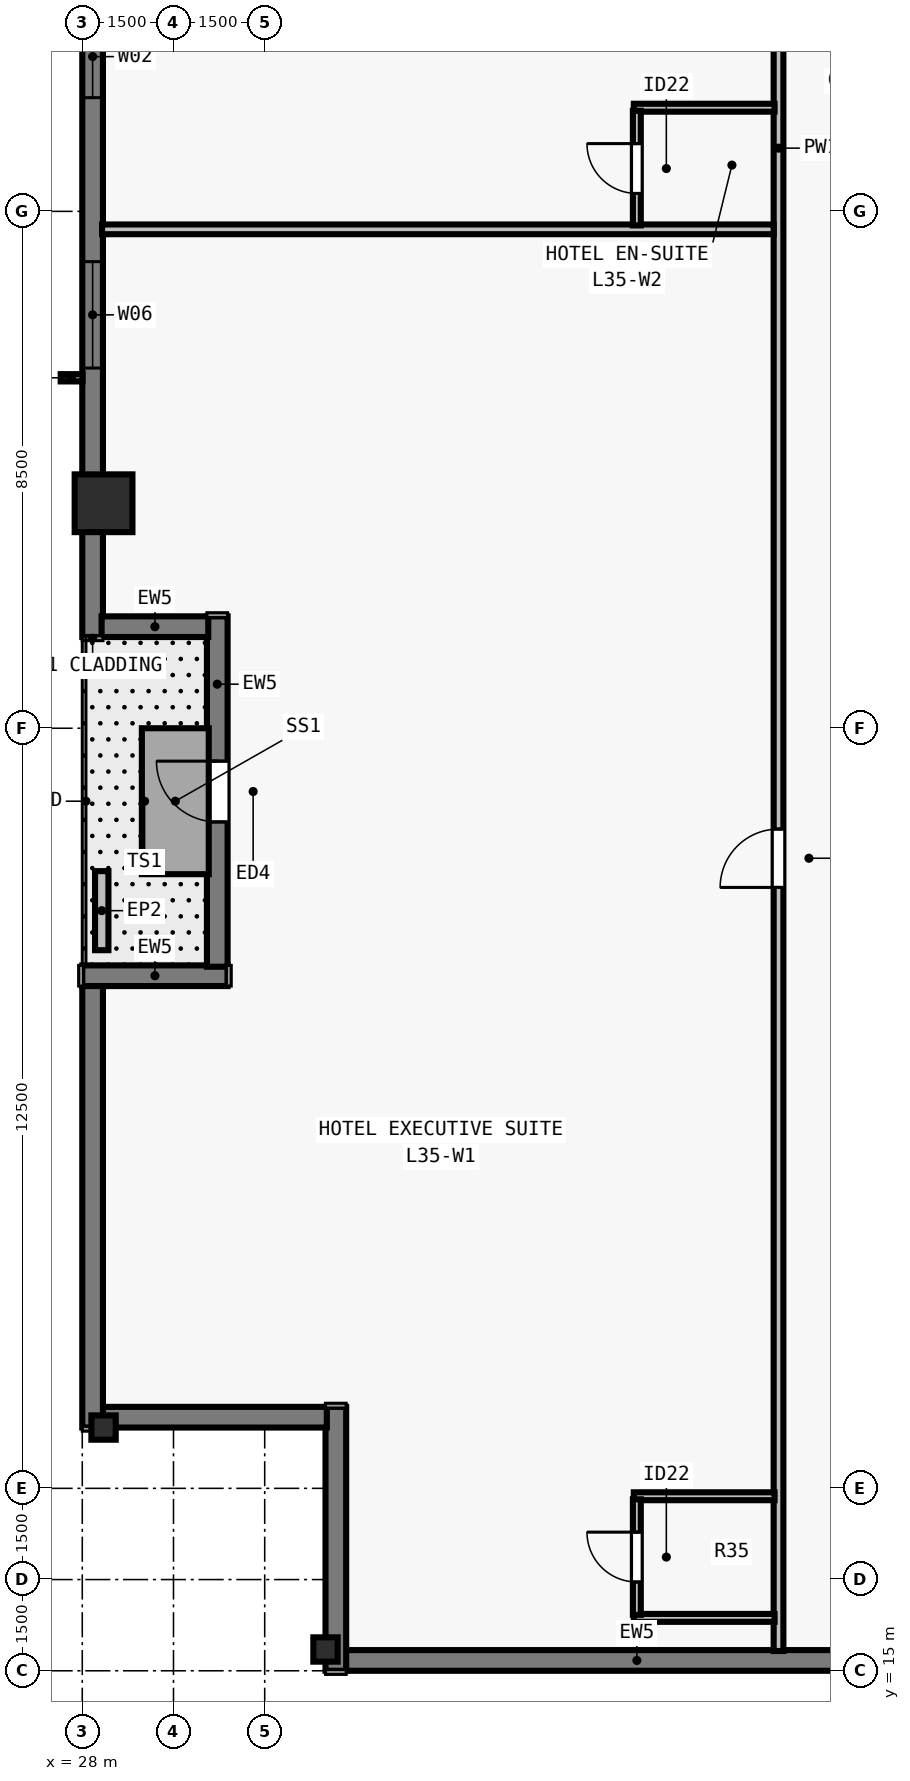
"""IFC4 building model, lengths in metres.
Left out: names, types, materials, properties, quantities, classifications, styles, units other than length and angle.
Written with IfcOpenShell. Run it as: python <this file> out.ifc"""

import sys

from ifc_helpers import new_model, si_unit, direction, frame, frame_2d, origin, origin_2d, place, context, subcontext, project, spatial, rectangle, i_section, extrude, element, fill, save


model = new_model("IFC4")
c1 = context("Model", 3, precision=1e-05, world=origin(), true_north=direction((0.0, 1.0)))
c2 = subcontext(c1, "Body", "Model", "MODEL_VIEW")
j1 = project(units=[si_unit("LENGTHUNIT", "METRE"), si_unit("PLANEANGLEUNIT", "RADIAN")], contexts=[c1])
p1 = place(None, origin())
s1 = spatial("IfcSite", under=j1, at=p1, CompositionType="ELEMENT")
p2 = place(p1, origin())
s2 = spatial("IfcBuilding", under=s1, at=p2, CompositionType="ELEMENT")
p3 = place(p2, frame((0.0, 0.0, 130.5)))
s3 = spatial("IfcBuildingStorey", under=s2, at=p3, CompositionType="ELEMENT", Elevation=130.5)
p4 = place(p3, frame((32.0, 15.35, 0.0), z_axis=(0.0, 0.0, 1.0), x_axis=(1.0, 0.0, 0.0)))
e1 = element("IfcColumn", 1, at=p4, inside=s3, PredefinedType="COLUMN", context=c2, shape_type="SweptSolid", body=[
    extrude(i_section(OverallWidth=0.4, OverallDepth=0.4, WebThickness=0.022, FlangeThickness=0.036, at=origin_2d()), origin(), (0.0, 0.0, 1.0), 3.5),
])
p5 = place(p3, frame((28.35, 34.2, 0.0), z_axis=(0.0, 0.0, 1.0), x_axis=(0.0, 1.0, 0.0)))
e2 = element("IfcColumn", 2, at=p5, inside=s3, PredefinedType="COLUMN", context=c2, shape_type="SweptSolid", body=[
    extrude(rectangle(XDim=0.95, YDim=0.95, at=origin_2d()), origin(), (0.0, 0.0, 1.0), 3.5),
])
p6 = place(p3, frame((28.35, 19.0, 0.0), z_axis=(0.0, 0.0, 1.0), x_axis=(0.0, 1.0, 0.0)))
e3 = element("IfcColumn", 3, at=p6, inside=s3, PredefinedType="COLUMN", context=c2, shape_type="SweptSolid", body=[
    extrude(i_section(OverallWidth=0.4, OverallDepth=0.4, WebThickness=0.022, FlangeThickness=0.036, at=origin_2d()), origin(), (0.0, 0.0, 1.0), 3.5),
])
p7 = place(p3, frame((28.17, 32.0, 0.0), z_axis=(0.0, 0.0, 1.0), x_axis=(0.0, 1.0, 0.0)))
e4 = element("IfcWall", 4, at=p7, inside=s3, PredefinedType="SOLIDWALL", context=c2, shape_type="SweptSolid", body=[
    extrude(rectangle(XDim=26.682, YDim=0.34, at=frame_2d((13.341, 0.0))), origin(), (0.0, 0.0, 1.0), 3.28),
])
p8 = place(p7, frame((4.423, 0.0, 0.8)))
e5 = element("IfcOpeningElement", 5, at=p8, cuts=e4, PredefinedType="OPENING", context=c2, shape_type="SweptSolid", body=[
    extrude(rectangle(XDim=1.75, YDim=1.66, at=frame_2d((0.875, 0.83))), frame((0.0, 0.18, 0.0), z_axis=(0.0, -1.0, 0.0), x_axis=(1.0, 0.0, 0.0)), (0.0, 0.0, 1.0), 0.36),
])
p9 = place(p7, frame((8.87, 0.0, 0.8)))
e6 = element("IfcOpeningElement", 6, at=p9, cuts=e4, PredefinedType="OPENING", context=c2, shape_type="SweptSolid", body=[
    extrude(rectangle(XDim=1.35, YDim=1.66, at=frame_2d((0.675, 0.83))), frame((0.0, 0.18, 0.0), z_axis=(0.0, -1.0, 0.0), x_axis=(1.0, 0.0, 0.0)), (0.0, 0.0, 1.0), 0.36),
])
p10 = place(p7, frame((12.916, 0.0, 0.8)))
e7 = element("IfcOpeningElement", 7, at=p10, cuts=e4, PredefinedType="OPENING", context=c2, shape_type="SweptSolid", body=[
    extrude(rectangle(XDim=1.75, YDim=1.66, at=frame_2d((0.875, 0.83))), frame((0.0, 0.18, 0.0), z_axis=(0.0, -1.0, 0.0), x_axis=(1.0, 0.0, 0.0)), (0.0, 0.0, 1.0), 0.36),
])
p11 = place(p7, frame((16.462, 0.0, 0.8)))
e8 = element("IfcOpeningElement", 8, at=p11, cuts=e4, PredefinedType="OPENING", context=c2, shape_type="SweptSolid", body=[
    extrude(rectangle(XDim=1.35, YDim=1.66, at=frame_2d((0.675, 0.83))), frame((0.0, 0.18, 0.0), z_axis=(0.0, -1.0, 0.0), x_axis=(1.0, 0.0, 0.0)), (0.0, 0.0, 1.0), 0.36),
])
p12 = place(p7, frame((20.059, 0.0, 0.8)))
e9 = element("IfcOpeningElement", 9, at=p12, cuts=e4, PredefinedType="OPENING", context=c2, shape_type="SweptSolid", body=[
    extrude(rectangle(XDim=1.75, YDim=1.66, at=frame_2d((0.875, 0.83))), frame((0.0, 0.18, 0.0), z_axis=(0.0, -1.0, 0.0), x_axis=(1.0, 0.0, 0.0)), (0.0, 0.0, 1.0), 0.36),
])
p13 = place(p3, frame((72.0, 15.17, 0.0), z_axis=(0.0, 0.0, 1.0), x_axis=(-1.0, 0.0, 0.0)))
e10 = element("IfcWall", 10, at=p13, inside=s3, PredefinedType="SOLIDWALL", context=c2, shape_type="SweptSolid", body=[
    extrude(rectangle(XDim=39.682, YDim=0.34, at=frame_2d((19.841, 0.0))), origin(), (0.0, 0.0, 1.0), 3.28),
])
p14 = place(p13, frame((8.955, 0.0, 0.8)))
e11 = element("IfcOpeningElement", 11, at=p14, cuts=e10, PredefinedType="OPENING", context=c2, shape_type="SweptSolid", body=[
    extrude(rectangle(XDim=1.35, YDim=1.66, at=frame_2d((0.675, 0.83))), frame((0.0, 0.18, 0.0), z_axis=(0.0, -1.0, 0.0), x_axis=(1.0, 0.0, 0.0)), (0.0, 0.0, 1.0), 0.36),
])
p15 = place(p13, frame((11.859, 0.0, 0.8)))
e12 = element("IfcOpeningElement", 12, at=p15, cuts=e10, PredefinedType="OPENING", context=c2, shape_type="SweptSolid", body=[
    extrude(rectangle(XDim=1.75, YDim=1.66, at=frame_2d((0.875, 0.83))), frame((0.0, 0.18, 0.0), z_axis=(0.0, -1.0, 0.0), x_axis=(1.0, 0.0, 0.0)), (0.0, 0.0, 1.0), 0.36),
])
p16 = place(p13, frame((16.062, 0.0, 0.8)))
e13 = element("IfcOpeningElement", 13, at=p16, cuts=e10, PredefinedType="OPENING", context=c2, shape_type="SweptSolid", body=[
    extrude(rectangle(XDim=1.35, YDim=1.66, at=frame_2d((0.675, 0.83))), frame((0.0, 0.18, 0.0), z_axis=(0.0, -1.0, 0.0), x_axis=(1.0, 0.0, 0.0)), (0.0, 0.0, 1.0), 0.36),
])
p17 = place(p13, frame((18.966, 0.0, 0.8)))
e14 = element("IfcOpeningElement", 14, at=p17, cuts=e10, PredefinedType="OPENING", context=c2, shape_type="SweptSolid", body=[
    extrude(rectangle(XDim=1.75, YDim=1.66, at=frame_2d((0.875, 0.83))), frame((0.0, 0.18, 0.0), z_axis=(0.0, -1.0, 0.0), x_axis=(1.0, 0.0, 0.0)), (0.0, 0.0, 1.0), 0.36),
])
p18 = place(p13, frame((21.469, 0.0, 0.8)))
e15 = element("IfcOpeningElement", 15, at=p18, cuts=e10, PredefinedType="OPENING", context=c2, shape_type="SweptSolid", body=[
    extrude(rectangle(XDim=1.35, YDim=1.66, at=frame_2d((0.675, 0.83))), frame((0.0, 0.18, 0.0), z_axis=(0.0, -1.0, 0.0), x_axis=(1.0, 0.0, 0.0)), (0.0, 0.0, 1.0), 0.36),
])
p19 = place(p13, frame((26.073, 0.0, 0.8)))
e16 = element("IfcOpeningElement", 16, at=p19, cuts=e10, PredefinedType="OPENING", context=c2, shape_type="SweptSolid", body=[
    extrude(rectangle(XDim=1.75, YDim=1.66, at=frame_2d((0.875, 0.83))), frame((0.0, 0.18, 0.0), z_axis=(0.0, -1.0, 0.0), x_axis=(1.0, 0.0, 0.0)), (0.0, 0.0, 1.0), 0.36),
])
p20 = place(p13, frame((28.577, 0.0, 0.8)))
e17 = element("IfcOpeningElement", 17, at=p20, cuts=e10, PredefinedType="OPENING", context=c2, shape_type="SweptSolid", body=[
    extrude(rectangle(XDim=1.35, YDim=1.66, at=frame_2d((0.675, 0.83))), frame((0.0, 0.18, 0.0), z_axis=(0.0, -1.0, 0.0), x_axis=(1.0, 0.0, 0.0)), (0.0, 0.0, 1.0), 0.36),
])
p21 = place(p3, frame((32.17, 15.0, 0.0), z_axis=(0.0, 0.0, 1.0), x_axis=(0.0, 1.0, 0.0)))
e18 = element("IfcWall", 18, at=p21, inside=s3, PredefinedType="SOLIDWALL", context=c2, shape_type="SweptSolid", body=[
    extrude(rectangle(XDim=4.34, YDim=0.34, at=frame_2d((2.17, 0.0))), origin(), (0.0, 0.0, 1.0), 3.28),
])
p22 = place(p3, frame((32.022, 19.17, 0.0), z_axis=(0.0, 0.0, 1.0), x_axis=(-1.0, 0.0, 0.0)))
e19 = element("IfcWall", 19, at=p22, inside=s3, PredefinedType="SOLIDWALL", context=c2, shape_type="SweptSolid", body=[
    extrude(rectangle(XDim=3.704, YDim=0.34, at=frame_2d((1.852, 0.0))), origin(), (0.0, 0.0, 1.0), 3.28),
])
p23 = place(p3, frame((28.17, 19.0, 0.0), z_axis=(0.0, 0.0, 1.0), x_axis=(0.0, 1.0, 0.0)))
e20 = element("IfcWall", 20, at=p23, inside=s3, PredefinedType="SOLIDWALL", context=c2, shape_type="SweptSolid", body=[
    extrude(rectangle(XDim=7.282, YDim=0.34, at=frame_2d((3.641, 0.0))), origin(), (0.0, 0.0, 1.0), 3.28),
])
p24 = place(p3, frame((28.0, 26.43, 0.0), z_axis=(0.0, 0.0, 1.0), x_axis=(1.0, 0.0, 0.0)))
e21 = element("IfcWall", 21, at=p24, inside=s3, PredefinedType="SOLIDWALL", context=c2, shape_type="SweptSolid", body=[
    extrude(rectangle(XDim=2.39, YDim=0.34, at=frame_2d((1.195, 0.0))), origin(), (0.0, 0.0, 1.0), 3.28),
])
p25 = place(p3, frame((30.22, 26.578, 0.0), z_axis=(0.0, 0.0, 1.0), x_axis=(0.0, 1.0, 0.0)))
e22 = element("IfcWall", 22, at=p25, inside=s3, PredefinedType="SOLIDWALL", context=c2, shape_type="SweptSolid", body=[
    extrude(rectangle(XDim=5.762, YDim=0.34, at=frame_2d((2.881, 0.0))), origin(), (0.0, 0.0, 1.0), 3.28),
])
p26 = place(p25, frame((2.381, 0.0, 0.0)))
e23 = element("IfcOpeningElement", 23, at=p26, cuts=e22, PredefinedType="OPENING", context=c2, shape_type="SweptSolid", body=[
    extrude(rectangle(XDim=1.0, YDim=2.15, at=frame_2d((0.5, 1.075))), frame((0.0, 0.18, 0.0), z_axis=(0.0, -1.0, 0.0), x_axis=(1.0, 0.0, 0.0)), (0.0, 0.0, 1.0), 0.36),
])
p27 = place(p3, frame((30.072, 32.17, 0.0), z_axis=(0.0, 0.0, 1.0), x_axis=(-1.0, 0.0, 0.0)))
e24 = element("IfcWall", 24, at=p27, inside=s3, PredefinedType="SOLIDWALL", context=c2, shape_type="SweptSolid", body=[
    extrude(rectangle(XDim=1.754, YDim=0.34, at=frame_2d((0.877, 0.0))), origin(), (0.0, 0.0, 1.0), 3.28),
])
p28 = place(p3, frame((28.32, 26.85, 0.0), z_axis=(0.0, 0.0, 1.0), x_axis=(0.0, 1.0, 0.0)))
e25 = element("IfcWall", 25, at=p28, inside=s3, PredefinedType="PARAPET", context=c2, shape_type="SweptSolid", body=[
    extrude(rectangle(XDim=1.3, YDim=0.22, at=frame_2d((0.65, 0.0))), origin(), (0.0, 0.0, 1.0), 0.55),
])
p29 = place(p3, frame((39.45, 15.325, 0.0), z_axis=(0.0, 0.0, 1.0), x_axis=(0.0, 1.0, 0.0)))
e26 = element("IfcWall", 26, at=p29, inside=s3, PredefinedType="PARTITIONING", context=c2, shape_type="SweptSolid", body=[
    extrude(rectangle(XDim=47.35, YDim=0.16, at=frame_2d((23.675, 0.0))), origin(), (0.0, 0.0, 1.0), 2.555),
])
p30 = place(p29, frame((12.557, 0.0, 0.0)))
e27 = element("IfcOpeningElement", 27, at=p30, cuts=e26, PredefinedType="OPENING", context=c2, shape_type="SweptSolid", body=[
    extrude(rectangle(XDim=0.96, YDim=2.15, at=frame_2d((0.48, 1.075))), frame((0.0, 0.09, 0.0), z_axis=(0.0, -1.0, 0.0), x_axis=(1.0, 0.0, 0.0)), (0.0, 0.0, 1.0), 0.18),
])
p31 = place(p29, frame((35.912, 0.0, 0.0)))
e28 = element("IfcOpeningElement", 28, at=p31, cuts=e26, PredefinedType="OPENING", context=c2, shape_type="SweptSolid", body=[
    extrude(rectangle(XDim=0.96, YDim=2.15, at=frame_2d((0.48, 1.075))), frame((0.0, 0.09, 0.0), z_axis=(0.0, -1.0, 0.0), x_axis=(1.0, 0.0, 0.0)), (0.0, 0.0, 1.0), 0.18),
])
for number, where, z_axis, x_axis in (
    (29, (37.07, 15.87, 0.0), (0.0, 0.0, 1.0), (1.0, 0.0, 0.0)),
    (30, (37.07, 17.87, 0.0), (0.0, 0.0, 1.0), (1.0, 0.0, 0.0)),
):
    element("IfcWall", number, at=place(p3, frame(where, z_axis=z_axis, x_axis=x_axis)), inside=s3, PredefinedType="PLUMBINGWALL", context=c2, shape_type="SweptSolid", body=[
        extrude(rectangle(XDim=2.315, YDim=0.13, at=frame_2d((1.157, 0.0))), origin(), (0.0, 0.0, 1.0), 3.28),
    ])
p32 = place(p3, frame((37.12, 15.92, 0.0), z_axis=(0.0, 0.0, 1.0), x_axis=(0.0, 1.0, 0.0)))
e31 = element("IfcWall", 31, at=p32, inside=s3, PredefinedType="PLUMBINGWALL", context=c2, shape_type="SweptSolid", body=[
    extrude(rectangle(XDim=1.9, YDim=0.13, at=frame_2d((0.95, 0.0))), origin(), (0.0, 0.0, 1.0), 3.28),
])
p33 = place(p32, frame((0.54, 0.0, 0.0)))
e32 = element("IfcOpeningElement", 32, at=p33, cuts=e31, PredefinedType="OPENING", context=c2, shape_type="SweptSolid", body=[
    extrude(rectangle(XDim=0.82, YDim=2.1, at=frame_2d((0.41, 1.05))), frame((0.0, 0.075, 0.0), z_axis=(0.0, -1.0, 0.0), x_axis=(1.0, 0.0, 0.0)), (0.0, 0.0, 1.0), 0.15),
])
p34 = place(p3, frame((28.325, 38.704, 0.0), z_axis=(0.0, 0.0, 1.0), x_axis=(1.0, 0.0, 0.0)))
e33 = element("IfcWall", 33, at=p34, inside=s3, PredefinedType="PARTITIONING", context=c2, shape_type="SweptSolid", body=[
    extrude(rectangle(XDim=11.045, YDim=0.16, at=frame_2d((5.522, 0.0))), origin(), (0.0, 0.0, 1.0), 2.896),
])
p35 = place(p3, frame((37.07, 40.704, 0.0), z_axis=(0.0, 0.0, 1.0), x_axis=(1.0, 0.0, 0.0)))
e34 = element("IfcWall", 34, at=p35, inside=s3, PredefinedType="PLUMBINGWALL", context=c2, shape_type="SweptSolid", body=[
    extrude(rectangle(XDim=2.315, YDim=0.13, at=frame_2d((1.157, 0.0))), origin(), (0.0, 0.0, 1.0), 3.28),
])
p36 = place(p3, frame((37.12, 38.769, 0.0), z_axis=(0.0, 0.0, 1.0), x_axis=(0.0, 1.0, 0.0)))
e35 = element("IfcWall", 35, at=p36, inside=s3, PredefinedType="PLUMBINGWALL", context=c2, shape_type="SweptSolid", body=[
    extrude(rectangle(XDim=1.885, YDim=0.13, at=frame_2d((0.942, 0.0))), origin(), (0.0, 0.0, 1.0), 3.28),
])
p37 = place(p36, frame((0.525, 0.0, 0.0)))
e36 = element("IfcOpeningElement", 36, at=p37, cuts=e35, PredefinedType="OPENING", context=c2, shape_type="SweptSolid", body=[
    extrude(rectangle(XDim=0.82, YDim=2.1, at=frame_2d((0.41, 1.05))), frame((0.0, 0.075, 0.0), z_axis=(0.0, -1.0, 0.0), x_axis=(1.0, 0.0, 0.0)), (0.0, 0.0, 1.0), 0.15),
])
p38 = place(p8, origin())
e37 = element("IfcWindow", 37, at=p38, inside=s3, PartitioningType="SINGLE_PANEL", PredefinedType="WINDOW", context=c2, shape_type="SweptSolid", body=[
    extrude(rectangle(XDim=1.75, YDim=1.66, at=frame_2d((0.875, 0.83))), frame((0.0, -0.05, 0.0), z_axis=(0.0, -1.0, 0.0), x_axis=(1.0, 0.0, 0.0)), (0.0, 0.0, 1.0), 0.06),
])
fill(e5, e37)
p39 = place(p9, origin())
e38 = element("IfcWindow", 38, at=p39, inside=s3, PartitioningType="SINGLE_PANEL", PredefinedType="WINDOW", context=c2, shape_type="SweptSolid", body=[
    extrude(rectangle(XDim=1.35, YDim=1.66, at=frame_2d((0.675, 0.83))), frame((0.0, -0.05, 0.0), z_axis=(0.0, -1.0, 0.0), x_axis=(1.0, 0.0, 0.0)), (0.0, 0.0, 1.0), 0.06),
])
fill(e6, e38)
p40 = place(p26, origin())
e39 = element("IfcDoor", 39, at=p40, inside=s3, OperationType="SINGLE_SWING_RIGHT", PredefinedType="DOOR", context=c2, shape_type="SweptSolid", body=[
    extrude(rectangle(XDim=1.0, YDim=2.15, at=frame_2d((0.5, 1.075))), frame((0.0, 0.025, 0.0), z_axis=(0.0, -1.0, 0.0), x_axis=(1.0, 0.0, 0.0)), (0.0, 0.0, 1.0), 0.05),
])
fill(e23, e39)
p41 = place(p33, origin())
e40 = element("IfcDoor", 40, at=p41, inside=s3, OperationType="SINGLE_SWING_RIGHT", PredefinedType="DOOR", context=c2, shape_type="SweptSolid", body=[
    extrude(rectangle(XDim=0.82, YDim=2.1, at=frame_2d((0.41, 1.05))), frame((0.0, 0.025, 0.0), z_axis=(0.0, -1.0, 0.0), x_axis=(1.0, 0.0, 0.0)), (0.0, 0.0, 1.0), 0.05),
])
fill(e32, e40)
p42 = place(p30, origin())
e41 = element("IfcDoor", 41, at=p42, inside=s3, OperationType="SINGLE_SWING_LEFT", PredefinedType="DOOR", context=c2, shape_type="SweptSolid", body=[
    extrude(rectangle(XDim=0.96, YDim=2.15, at=frame_2d((0.48, 1.075))), frame((0.0, 0.025, 0.0), z_axis=(0.0, -1.0, 0.0), x_axis=(1.0, 0.0, 0.0)), (0.0, 0.0, 1.0), 0.05),
])
fill(e27, e41)
p43 = place(p37, origin())
e42 = element("IfcDoor", 42, at=p43, inside=s3, OperationType="SINGLE_SWING_RIGHT", PredefinedType="DOOR", context=c2, shape_type="SweptSolid", body=[
    extrude(rectangle(XDim=0.82, YDim=2.1, at=frame_2d((0.41, 1.05))), frame((0.0, 0.025, 0.0), z_axis=(0.0, -1.0, 0.0), x_axis=(1.0, 0.0, 0.0)), (0.0, 0.0, 1.0), 0.05),
])
fill(e36, e42)
save(model, sys.argv[1])
